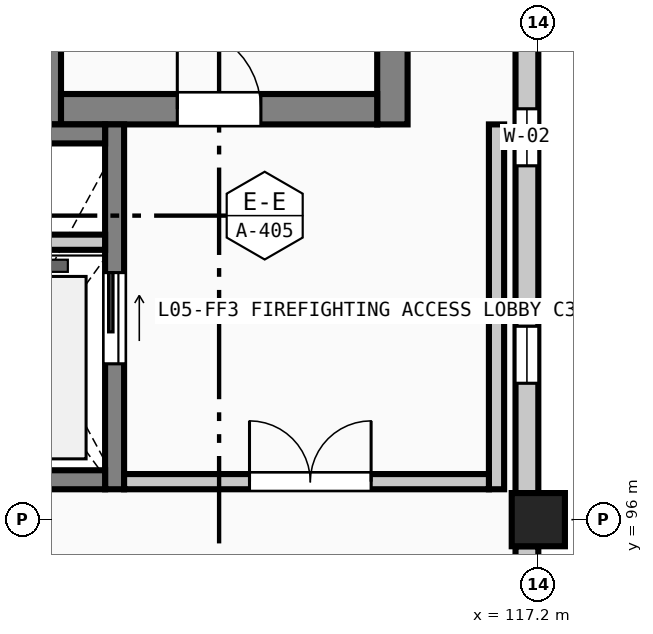
"""IFC4 building model, lengths in metres.
Left out: names, types, materials, properties, quantities, classifications, styles, units other than length and angle.
Written with IfcOpenShell. Run it as: python <this file> out.ifc"""

import sys

from ifc_helpers import new_model, si_unit, direction, frame, frame_2d, origin, origin_2d, place, context, subcontext, project, spatial, rectangle, extrude, element, fill, save


model = new_model("IFC4")
c1 = context("Model", 3, precision=1e-05, world=origin(), true_north=direction((0.0, 1.0)))
c2 = subcontext(c1, "Body", "Model", "MODEL_VIEW")
j1 = project(units=[si_unit("LENGTHUNIT", "METRE"), si_unit("PLANEANGLEUNIT", "RADIAN")], contexts=[c1])
p1 = place(None, origin())
s1 = spatial("IfcSite", under=j1, at=p1, CompositionType="ELEMENT")
p2 = place(p1, origin())
s2 = spatial("IfcBuilding", under=s1, at=p2, CompositionType="ELEMENT")
p3 = place(p2, frame((0.0, 0.0, 23.36)))
s3 = spatial("IfcBuildingStorey", under=s2, at=p3, CompositionType="ELEMENT", Elevation=23.36)
p4 = place(p3, frame((117.2, 96.0, 0.0), z_axis=(0.0, 0.0, 1.0), x_axis=(1.0, 0.0, 0.0)))
e1 = element("IfcColumn", 1, at=p4, inside=s3, PredefinedType="COLUMN", context=c2, shape_type="SweptSolid", body=[
    extrude(rectangle(XDim=0.7, YDim=0.7, at=origin_2d()), origin(), (0.0, 0.0, 1.0), 4.48),
])
for number, where, z_axis, x_axis in (
    (2, (110.72, 101.2, 0.0), (0.0, 0.0, 1.0), (0.0, 1.0, 0.0)),
    (3, (115.28, 110.4, 0.0), (0.0, 0.0, 1.0), (0.0, -1.0, 0.0)),
):
    element("IfcWall", number, at=place(p3, frame(where, z_axis=z_axis, x_axis=x_axis)), inside=s3, PredefinedType="SHEAR", context=c2, shape_type="SweptSolid", body=[
        extrude(rectangle(XDim=9.2, YDim=0.4, at=frame_2d((4.6, 0.0))), origin(), (0.0, 0.0, 1.0), 4.205),
    ])
p5 = place(p3, frame((115.08, 101.4, 0.0), z_axis=(0.0, 0.0, 1.0), x_axis=(-1.0, 0.0, 0.0)))
e4 = element("IfcWall", 4, at=p5, inside=s3, PredefinedType="SHEAR", context=c2, shape_type="SweptSolid", body=[
    extrude(rectangle(XDim=4.16, YDim=0.4, at=frame_2d((2.08, 0.0))), origin(), (0.0, 0.0, 1.0), 4.205),
])
p6 = place(p5, frame((1.53, 0.0, 0.0)))
e5 = element("IfcOpeningElement", 5, at=p6, cuts=e4, PredefinedType="OPENING", context=c2, shape_type="SweptSolid", body=[
    extrude(rectangle(XDim=1.1, YDim=2.2, at=frame_2d((0.55, 1.1))), frame((0.0, 0.21, 0.0), z_axis=(0.0, -1.0, 0.0), x_axis=(1.0, 0.0, 0.0)), (0.0, 0.0, 1.0), 0.42),
])
p7 = place(p3, frame((111.625, 101.2, 0.0), z_axis=(0.0, 0.0, 1.0), x_axis=(0.0, -1.0, 0.0)))
e6 = element("IfcWall", 6, at=p7, inside=s3, PredefinedType="SOLIDWALL", context=c2, shape_type="SweptSolid", body=[
    extrude(rectangle(XDim=4.8, YDim=0.25, at=frame_2d((2.4, 0.0))), origin(), (0.0, 0.0, 1.0), 4.205),
])
p8 = place(p7, frame((1.95, 0.0, 0.0)))
e7 = element("IfcOpeningElement", 7, at=p8, cuts=e6, PredefinedType="OPENING", context=c2, shape_type="SweptSolid", body=[
    extrude(rectangle(XDim=1.2, YDim=2.2, at=frame_2d((0.6, 1.1))), frame((0.0, 0.135, 0.0), z_axis=(0.0, -1.0, 0.0), x_axis=(1.0, 0.0, 0.0)), (0.0, 0.0, 1.0), 0.27),
])
for number, where, z_axis, x_axis in (
    (8, (111.5, 96.525, 0.0), (0.0, 0.0, 1.0), (-1.0, 0.0, 0.0)),
    (9, (109.4, 101.075, 0.0), (0.0, 0.0, 1.0), (1.0, 0.0, 0.0)),
):
    element("IfcWall", number, at=place(p3, frame(where, z_axis=z_axis, x_axis=x_axis)), inside=s3, PredefinedType="SOLIDWALL", context=c2, shape_type="SweptSolid", body=[
        extrude(rectangle(XDim=2.1, YDim=0.25, at=frame_2d((1.05, 0.0))), origin(), (0.0, 0.0, 1.0), 4.205),
    ])
p9 = place(p3, frame((109.4, 99.65, 0.0), z_axis=(0.0, 0.0, 1.0), x_axis=(1.0, 0.0, 0.0)))
e10 = element("IfcWall", 10, at=p9, inside=s3, PredefinedType="SOLIDWALL", context=c2, shape_type="SweptSolid", body=[
    extrude(rectangle(XDim=2.1, YDim=0.2, at=frame_2d((1.05, 0.0))), origin(), (0.0, 0.0, 1.0), 4.205),
])
p10 = place(p3, frame((116.65, 101.2, 0.0), z_axis=(0.0, 0.0, 1.0), x_axis=(0.0, -1.0, 0.0)))
e11 = element("IfcWall", 11, at=p10, inside=s3, PredefinedType="SOLIDWALL", context=c2, shape_type="SweptSolid", body=[
    extrude(rectangle(XDim=4.8, YDim=0.2, at=frame_2d((2.4, 0.0))), origin(), (0.0, 0.0, 1.0), 4.205),
])
p11 = place(p3, frame((116.55, 96.5, 0.0), z_axis=(0.0, 0.0, 1.0), x_axis=(-1.0, 0.0, 0.0)))
e12 = element("IfcWall", 12, at=p11, inside=s3, PredefinedType="SOLIDWALL", context=c2, shape_type="SweptSolid", body=[
    extrude(rectangle(XDim=4.8, YDim=0.2, at=frame_2d((2.4, 0.0))), origin(), (0.0, 0.0, 1.0), 4.205),
])
p12 = place(p11, frame((1.55, 0.0, 0.0)))
e13 = element("IfcOpeningElement", 13, at=p12, cuts=e12, PredefinedType="OPENING", context=c2, shape_type="SweptSolid", body=[
    extrude(rectangle(XDim=1.6, YDim=2.2, at=frame_2d((0.8, 1.1))), frame((0.0, 0.11, 0.0), z_axis=(0.0, -1.0, 0.0), x_axis=(1.0, 0.0, 0.0)), (0.0, 0.0, 1.0), 0.22),
])
p13 = place(p3, frame((117.05, 102.85, 0.0), z_axis=(0.0, 0.0, 1.0), x_axis=(0.0, -1.0, 0.0)))
e14 = element("IfcWall", 14, at=p13, inside=s3, PredefinedType="SOLIDWALL", context=c2, shape_type="SweptSolid", body=[
    extrude(rectangle(XDim=6.5, YDim=0.3, at=frame_2d((3.25, 0.0))), origin(), (0.0, 0.0, 1.0), 3.88),
])
p14 = place(p13, frame((1.445, 0.0, 0.9)))
e15 = element("IfcOpeningElement", 15, at=p14, cuts=e14, PredefinedType="OPENING", context=c2, shape_type="SweptSolid", body=[
    extrude(rectangle(XDim=0.75, YDim=2.4, at=frame_2d((0.375, 1.2))), frame((0.0, 0.16, 0.0), z_axis=(0.0, -1.0, 0.0), x_axis=(1.0, 0.0, 0.0)), (0.0, 0.0, 1.0), 0.32),
])
p15 = place(p13, frame((4.305, 0.0, 0.9)))
e16 = element("IfcOpeningElement", 16, at=p15, cuts=e14, PredefinedType="OPENING", context=c2, shape_type="SweptSolid", body=[
    extrude(rectangle(XDim=0.75, YDim=2.4, at=frame_2d((0.375, 1.2))), frame((0.0, 0.16, 0.0), z_axis=(0.0, -1.0, 0.0), x_axis=(1.0, 0.0, 0.0)), (0.0, 0.0, 1.0), 0.32),
])
p16 = place(p3, frame((117.05, 95.65, 0.0), z_axis=(0.0, 0.0, 1.0), x_axis=(0.0, -1.0, 0.0)))
e17 = element("IfcWall", 17, at=p16, inside=s3, PredefinedType="SOLIDWALL", context=c2, shape_type="SweptSolid", body=[
    extrude(rectangle(XDim=6.5, YDim=0.3, at=frame_2d((3.25, 0.0))), origin(), (0.0, 0.0, 1.0), 3.13),
])
p17 = place(p16, frame((1.22, 0.0, 0.9)))
e18 = element("IfcOpeningElement", 18, at=p17, cuts=e17, PredefinedType="OPENING", context=c2, shape_type="SweptSolid", body=[
    extrude(rectangle(XDim=1.2, YDim=1.8, at=frame_2d((0.6, 0.9))), frame((0.0, 0.16, 0.0), z_axis=(0.0, -1.0, 0.0), x_axis=(1.0, 0.0, 0.0)), (0.0, 0.0, 1.0), 0.32),
])
p18 = place(p16, frame((4.08, 0.0, 0.9)))
e19 = element("IfcOpeningElement", 19, at=p18, cuts=e17, PredefinedType="OPENING", context=c2, shape_type="SweptSolid", body=[
    extrude(rectangle(XDim=1.2, YDim=1.8, at=frame_2d((0.6, 0.9))), frame((0.0, 0.16, 0.0), z_axis=(0.0, -1.0, 0.0), x_axis=(1.0, 0.0, 0.0)), (0.0, 0.0, 1.0), 0.32),
])
p19 = place(p6, frame((1.1, 0.0, 0.0), z_axis=(0.0, 0.0, 1.0), x_axis=(-1.0, 0.0, 0.0)))
e20 = element("IfcDoor", 20, at=p19, inside=s3, OperationType="SINGLE_SWING_LEFT", PredefinedType="DOOR", context=c2, shape_type="SweptSolid", body=[
    extrude(rectangle(XDim=1.1, YDim=2.2, at=frame_2d((0.55, 1.1))), frame((0.0, 0.025, 0.0), z_axis=(0.0, -1.0, 0.0), x_axis=(1.0, 0.0, 0.0)), (0.0, 0.0, 1.0), 0.05),
])
fill(e5, e20)
p20 = place(p8, origin())
e21 = element("IfcDoor", 21, at=p20, inside=s3, OperationType="SLIDING_TO_LEFT", PredefinedType="DOOR", context=c2, shape_type="SweptSolid", body=[
    extrude(rectangle(XDim=1.2, YDim=2.2, at=frame_2d((0.6, 1.1))), frame((0.0, 0.025, 0.0), z_axis=(0.0, -1.0, 0.0), x_axis=(1.0, 0.0, 0.0)), (0.0, 0.0, 1.0), 0.05),
])
fill(e7, e21)
p21 = place(p12, frame((1.6, 0.0, 0.0), z_axis=(0.0, 0.0, 1.0), x_axis=(-1.0, 0.0, 0.0)))
e22 = element("IfcDoor", 22, at=p21, inside=s3, OperationType="DOUBLE_DOOR_SINGLE_SWING", PredefinedType="DOOR", context=c2, shape_type="SweptSolid", body=[
    extrude(rectangle(XDim=1.6, YDim=2.2, at=frame_2d((0.8, 1.1))), frame((0.0, 0.025, 0.0), z_axis=(0.0, -1.0, 0.0), x_axis=(1.0, 0.0, 0.0)), (0.0, 0.0, 1.0), 0.05),
])
fill(e13, e22)
p22 = place(p14, origin())
e23 = element("IfcWindow", 23, at=p22, inside=s3, PartitioningType="SINGLE_PANEL", PredefinedType="WINDOW", context=c2, shape_type="SweptSolid", body=[
    extrude(rectangle(XDim=0.75, YDim=2.4, at=frame_2d((0.375, 1.2))), frame((0.0, 0.03, 0.0), z_axis=(0.0, -1.0, 0.0), x_axis=(1.0, 0.0, 0.0)), (0.0, 0.0, 1.0), 0.06),
])
fill(e15, e23)
p23 = place(p15, origin())
e24 = element("IfcWindow", 24, at=p23, inside=s3, PartitioningType="SINGLE_PANEL", PredefinedType="WINDOW", context=c2, shape_type="SweptSolid", body=[
    extrude(rectangle(XDim=0.75, YDim=2.4, at=frame_2d((0.375, 1.2))), frame((0.0, 0.03, 0.0), z_axis=(0.0, -1.0, 0.0), x_axis=(1.0, 0.0, 0.0)), (0.0, 0.0, 1.0), 0.06),
])
fill(e16, e24)
save(model, sys.argv[1])
